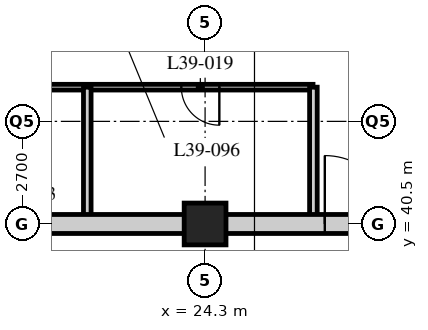
"""IFC4 building model, lengths in metres.
Left out: names, types, materials, properties, quantities, classifications, styles, units other than length and angle.
Written with IfcOpenShell. Run it as: python <this file> out.ifc"""

import sys

from ifc_helpers import new_model, si_unit, direction, frame, frame_2d, origin, origin_2d, place, context, subcontext, project, spatial, rectangle, hollow_rectangle, extrude, element, fill, save


model = new_model("IFC4")
c1 = context("Model", 3, precision=1e-05, world=origin(), true_north=direction((0.0, 1.0)))
c2 = subcontext(c1, "Body", "Model", "MODEL_VIEW")
j1 = project(units=[si_unit("LENGTHUNIT", "METRE"), si_unit("PLANEANGLEUNIT", "RADIAN")], contexts=[c1])
p1 = place(None, origin())
s1 = spatial("IfcSite", under=j1, at=p1, CompositionType="ELEMENT")
p2 = place(p1, origin())
s2 = spatial("IfcBuilding", under=s1, at=p2, CompositionType="ELEMENT")
p3 = place(p2, frame((0.0, 0.0, 151.0)))
s3 = spatial("IfcBuildingStorey", under=s2, at=p3, CompositionType="ELEMENT", Elevation=151.0)
p4 = place(p3, frame((24.3, 40.5, 0.0), z_axis=(0.0, 0.0, 1.0), x_axis=(1.0, 0.0, 0.0)))
e1 = element("IfcColumn", 1, at=p4, inside=s3, PredefinedType="COLUMN", context=c2, shape_type="SweptSolid", body=[
    extrude(hollow_rectangle(XDim=1.1, YDim=1.1, WallThickness=0.1, at=origin_2d()), origin(), (0.0, 0.0, 1.0), 3.4),
])
p5 = place(p3, frame((27.14, 44.1, 0.0), z_axis=(0.0, 0.0, 1.0), x_axis=(-1.0, 0.0, 0.0)))
e2 = element("IfcWall", 2, at=p5, inside=s3, PredefinedType="PARTITIONING", context=c2, shape_type="SweptSolid", body=[
    extrude(rectangle(XDim=17.24, YDim=0.15, at=frame_2d((8.62, 0.0))), origin(), (0.0, 0.0, 1.0), 3.19),
])
p6 = place(p5, frame((15.351, 0.0, 0.0)))
e3 = element("IfcOpeningElement", 3, at=p6, cuts=e2, PredefinedType="OPENING", context=c2, shape_type="SweptSolid", body=[
    extrude(rectangle(XDim=1.0, YDim=2.1, at=frame_2d((0.5, 1.05))), frame((0.0, 0.085, 0.0), z_axis=(0.0, -1.0, 0.0), x_axis=(1.0, 0.0, 0.0)), (0.0, 0.0, 1.0), 0.17),
])
p7 = place(p5, frame((12.201, 0.0, 0.0)))
e4 = element("IfcOpeningElement", 4, at=p7, cuts=e2, PredefinedType="OPENING", context=c2, shape_type="SweptSolid", body=[
    extrude(rectangle(XDim=1.0, YDim=2.1, at=frame_2d((0.5, 1.05))), frame((0.0, 0.085, 0.0), z_axis=(0.0, -1.0, 0.0), x_axis=(1.0, 0.0, 0.0)), (0.0, 0.0, 1.0), 0.17),
])
p8 = place(p5, frame((7.94, 0.0, 0.0)))
e5 = element("IfcOpeningElement", 5, at=p8, cuts=e2, PredefinedType="OPENING", context=c2, shape_type="SweptSolid", body=[
    extrude(rectangle(XDim=1.0, YDim=2.1, at=frame_2d((0.5, 1.05))), frame((0.0, 0.085, 0.0), z_axis=(0.0, -1.0, 0.0), x_axis=(1.0, 0.0, 0.0)), (0.0, 0.0, 1.0), 0.17),
])
p9 = place(p5, frame((2.465, 0.0, 0.0)))
e6 = element("IfcOpeningElement", 6, at=p9, cuts=e2, PredefinedType="OPENING", context=c2, shape_type="SweptSolid", body=[
    extrude(rectangle(XDim=1.0, YDim=2.1, at=frame_2d((0.5, 1.05))), frame((0.0, 0.085, 0.0), z_axis=(0.0, -1.0, 0.0), x_axis=(1.0, 0.0, 0.0)), (0.0, 0.0, 1.0), 0.17),
])
for number, where, z_axis, x_axis in (
    (7, (21.2, 44.1, 0.0), (0.0, 0.0, 1.0), (0.0, -1.0, 0.0)),
    (8, (27.15, 40.5, 0.0), (0.0, 0.0, 1.0), (0.0, 1.0, 0.0)),
):
    element("IfcWall", number, at=place(p3, frame(where, z_axis=z_axis, x_axis=x_axis)), inside=s3, PredefinedType="SOLIDWALL", context=c2, shape_type="SweptSolid", body=[
        extrude(rectangle(XDim=3.6, YDim=0.2, at=frame_2d((1.8, 0.0))), origin(), (0.0, 0.0, 1.0), 3.19),
    ])
p10 = place(p3, frame((15.95, 40.5, 0.0), z_axis=(0.0, 0.0, 1.0), x_axis=(1.0, 0.0, 0.0)))
e9 = element("IfcWall", 9, at=p10, inside=s3, PredefinedType="SOLIDWALL", context=c2, shape_type="SweptSolid", body=[
    extrude(rectangle(XDim=24.8, YDim=0.5, at=frame_2d((12.4, 0.0))), origin(), (0.0, 0.0, 1.0), 2.42),
])
p11 = place(p10, frame((11.5, 0.0, 0.0)))
e10 = element("IfcOpeningElement", 10, at=p11, cuts=e9, PredefinedType="OPENING", context=c2, shape_type="SweptSolid", body=[
    extrude(rectangle(XDim=1.8, YDim=2.4, at=frame_2d((0.9, 1.2))), frame((0.0, 0.26, 0.0), z_axis=(0.0, -1.0, 0.0), x_axis=(1.0, 0.0, 0.0)), (0.0, 0.0, 1.0), 0.52),
])
p12 = place(p9, origin())
e11 = element("IfcDoor", 11, at=p12, inside=s3, OperationType="SINGLE_SWING_LEFT", PredefinedType="DOOR", context=c2, shape_type="SweptSolid", body=[
    extrude(rectangle(XDim=1.0, YDim=2.1, at=frame_2d((0.5, 1.05))), frame((0.0, 0.025, 0.0), z_axis=(0.0, -1.0, 0.0), x_axis=(1.0, 0.0, 0.0)), (0.0, 0.0, 1.0), 0.05),
])
fill(e6, e11)
p13 = place(p11, origin())
e12 = element("IfcDoor", 12, at=p13, inside=s3, OperationType="DOUBLE_DOOR_SINGLE_SWING", PredefinedType="DOOR", context=c2, shape_type="SweptSolid", body=[
    extrude(rectangle(XDim=1.8, YDim=2.4, at=frame_2d((0.9, 1.2))), frame((0.0, 0.025, 0.0), z_axis=(0.0, -1.0, 0.0), x_axis=(1.0, 0.0, 0.0)), (0.0, 0.0, 1.0), 0.05),
])
fill(e10, e12)
save(model, sys.argv[1])
